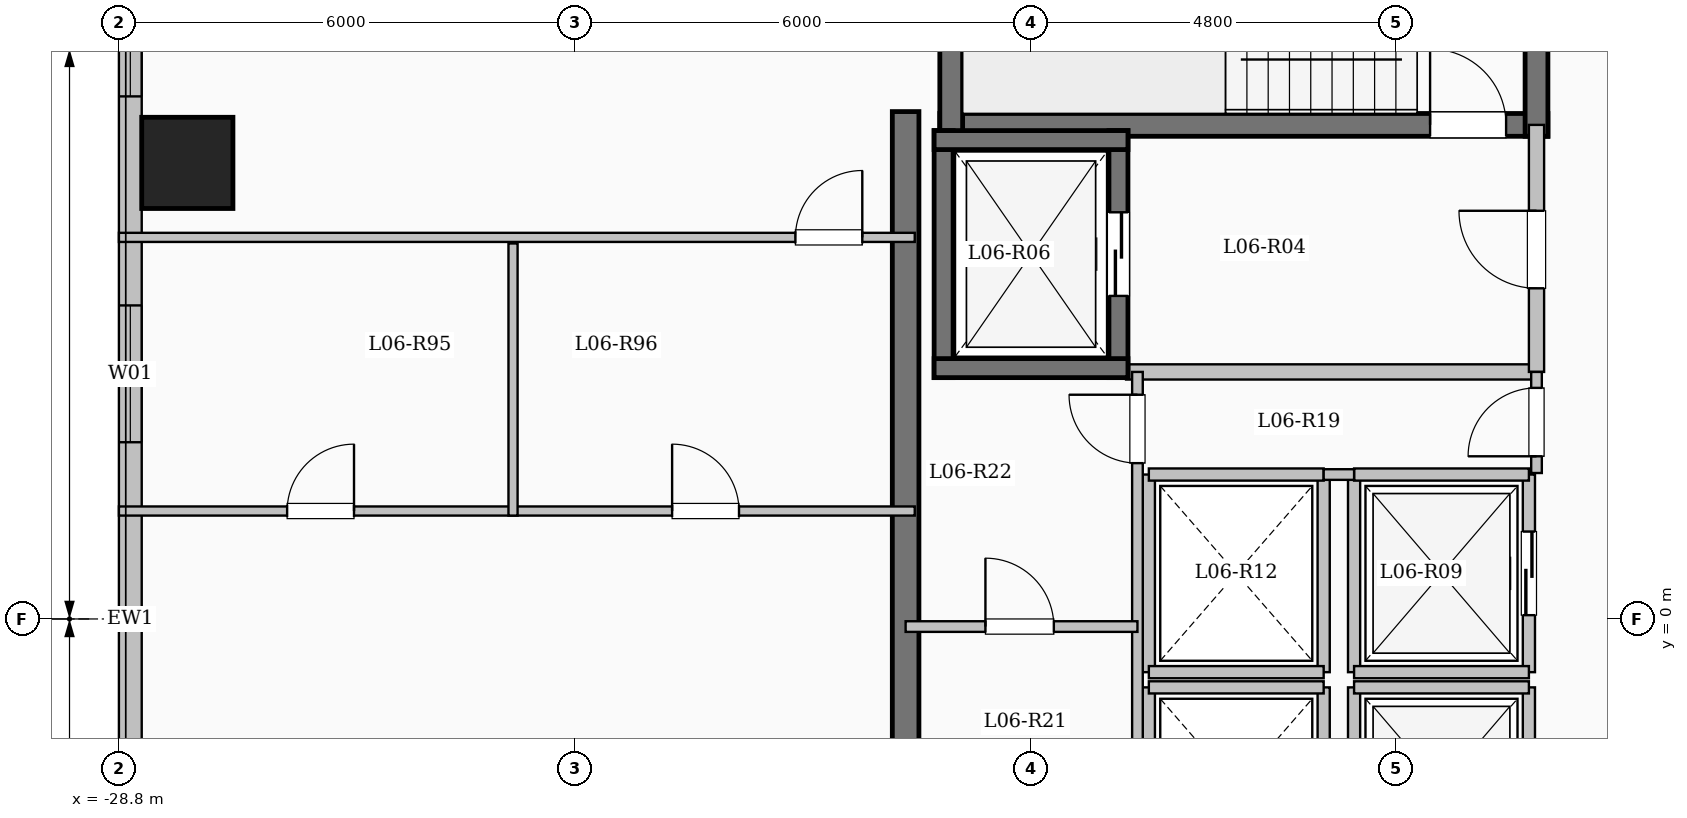
"""IFC4 building model, lengths in metres.
Left out: names, types, materials, properties, quantities, classifications, styles, units other than length and angle.
Written with IfcOpenShell. Run it as: python <this file> out.ifc"""

import sys

from ifc_helpers import new_model, si_unit, direction, frame, frame_2d, origin, origin_2d, place, context, subcontext, project, spatial, rectangle, extrude, element, fill, save


model = new_model("IFC4")
c1 = context("Model", 3, precision=1e-05, world=origin(), true_north=direction((0.0, 1.0)))
c2 = subcontext(c1, "Body", "Model", "MODEL_VIEW")
j1 = project(units=[si_unit("LENGTHUNIT", "METRE"), si_unit("PLANEANGLEUNIT", "RADIAN")], contexts=[c1])
p1 = place(None, origin())
s1 = spatial("IfcSite", under=j1, at=p1, CompositionType="ELEMENT")
p2 = place(p1, origin())
s2 = spatial("IfcBuilding", under=s1, at=p2, CompositionType="ELEMENT")
p3 = place(p2, frame((0.0, 0.0, 27.35)))
s3 = spatial("IfcBuildingStorey", under=s2, at=p3, CompositionType="ELEMENT", Elevation=27.35)
p4 = place(p3, frame((-27.9, 6.0, 0.0), z_axis=(0.0, 0.0, 1.0), x_axis=(1.0, 0.0, 0.0)))
e1 = element("IfcColumn", 1, at=p4, inside=s3, PredefinedType="COLUMN", context=c2, shape_type="SweptSolid", body=[
    extrude(rectangle(XDim=1.2, YDim=1.2, at=origin_2d()), origin(), (0.0, 0.0, 1.0), 3.35),
])
p5 = place(p3, frame((-28.65, -19.05, 0.0), z_axis=(0.0, 0.0, 1.0), x_axis=(0.0, 1.0, 0.0)))
e2 = element("IfcWall", 2, at=p5, inside=s3, PredefinedType="SOLIDWALL", context=c2, shape_type="SweptSolid", body=[
    extrude(rectangle(XDim=38.1, YDim=0.3, at=frame_2d((19.05, 0.0))), origin(), (0.0, 0.0, 1.0), 3.1),
])
p6 = place(p5, frame((3.15, 0.0, 0.9)))
e3 = element("IfcOpeningElement", 3, at=p6, cuts=e2, PredefinedType="OPENING", context=c2, shape_type="SweptSolid", body=[
    extrude(rectangle(XDim=2.4, YDim=1.8, at=frame_2d((1.2, 0.9))), frame((0.0, 0.16, 0.0), z_axis=(0.0, -1.0, 0.0), x_axis=(1.0, 0.0, 0.0)), (0.0, 0.0, 1.0), 0.32),
])
p7 = place(p5, frame((9.542, 0.0, 0.9)))
e4 = element("IfcOpeningElement", 4, at=p7, cuts=e2, PredefinedType="OPENING", context=c2, shape_type="SweptSolid", body=[
    extrude(rectangle(XDim=1.5, YDim=1.65, at=frame_2d((0.75, 0.825))), frame((0.0, 0.16, 0.0), z_axis=(0.0, -1.0, 0.0), x_axis=(1.0, 0.0, 0.0)), (0.0, 0.0, 1.0), 0.32),
])
p8 = place(p5, frame((14.95, 0.0, 0.9)))
e5 = element("IfcOpeningElement", 5, at=p8, cuts=e2, PredefinedType="OPENING", context=c2, shape_type="SweptSolid", body=[
    extrude(rectangle(XDim=2.4, YDim=1.8, at=frame_2d((1.2, 0.9))), frame((0.0, 0.16, 0.0), z_axis=(0.0, -1.0, 0.0), x_axis=(1.0, 0.0, 0.0)), (0.0, 0.0, 1.0), 0.32),
])
p9 = place(p5, frame((21.375, 0.0, 0.9)))
e6 = element("IfcOpeningElement", 6, at=p9, cuts=e2, PredefinedType="OPENING", context=c2, shape_type="SweptSolid", body=[
    extrude(rectangle(XDim=1.8, YDim=1.65, at=frame_2d((0.9, 0.825))), frame((0.0, 0.16, 0.0), z_axis=(0.0, -1.0, 0.0), x_axis=(1.0, 0.0, 0.0)), (0.0, 0.0, 1.0), 0.32),
])
p10 = place(p5, frame((25.925, 0.0, 0.9)))
e7 = element("IfcOpeningElement", 7, at=p10, cuts=e2, PredefinedType="OPENING", context=c2, shape_type="SweptSolid", body=[
    extrude(rectangle(XDim=2.0, YDim=1.7, at=frame_2d((1.0, 0.85))), frame((0.0, 0.16, 0.0), z_axis=(0.0, -1.0, 0.0), x_axis=(1.0, 0.0, 0.0)), (0.0, 0.0, 1.0), 0.32),
])
p11 = place(p5, frame((30.175, 0.0, 0.95)))
e8 = element("IfcOpeningElement", 8, at=p11, cuts=e2, PredefinedType="OPENING", context=c2, shape_type="SweptSolid", body=[
    extrude(rectangle(XDim=1.0, YDim=1.5, at=frame_2d((0.5, 0.75))), frame((0.0, 0.16, 0.0), z_axis=(0.0, -1.0, 0.0), x_axis=(1.0, 0.0, 0.0)), (0.0, 0.0, 1.0), 0.32),
])
p12 = place(p5, frame((33.85, 0.0, 0.9)))
e9 = element("IfcOpeningElement", 9, at=p12, cuts=e2, PredefinedType="OPENING", context=c2, shape_type="SweptSolid", body=[
    extrude(rectangle(XDim=2.0, YDim=1.7, at=frame_2d((1.0, 0.85))), frame((0.0, 0.16, 0.0), z_axis=(0.0, -1.0, 0.0), x_axis=(1.0, 0.0, 0.0)), (0.0, 0.0, 1.0), 0.32),
])
p13 = place(p3, frame((-18.0, 6.5, 0.0), z_axis=(0.0, 0.0, 1.0), x_axis=(1.0, 0.0, 0.0)))
e10 = element("IfcWall", 10, at=p13, inside=s3, PredefinedType="SHEAR", context=c2, shape_type="SweptSolid", body=[
    extrude(rectangle(XDim=8.0, YDim=0.3, at=frame_2d((4.0, 0.0))), origin(), (0.0, 0.0, 1.0), 3.35),
])
p14 = place(p13, frame((6.45, 0.0, 0.0)))
e11 = element("IfcOpeningElement", 11, at=p14, cuts=e10, PredefinedType="OPENING", context=c2, shape_type="SweptSolid", body=[
    extrude(rectangle(XDim=1.0, YDim=2.15, at=frame_2d((0.5, 1.075))), frame((0.0, 0.16, 0.0), z_axis=(0.0, -1.0, 0.0), x_axis=(1.0, 0.0, 0.0)), (0.0, 0.0, 1.0), 0.32),
])
for number, where, z_axis, x_axis in (
    (12, (-17.85, 6.35, 0.0), (0.0, 0.0, 1.0), (0.0, 1.0, 0.0)),
    (13, (-10.15, 6.35, 0.0), (0.0, 0.0, 1.0), (0.0, 1.0, 0.0)),
):
    element("IfcWall", number, at=place(p3, frame(where, z_axis=z_axis, x_axis=x_axis)), inside=s3, PredefinedType="SHEAR", context=c2, shape_type="SweptSolid", body=[
        extrude(rectangle(XDim=3.59, YDim=0.3, at=frame_2d((1.795, 0.0))), origin(), (0.0, 0.0, 1.0), 3.35),
    ])
p15 = place(p3, frame((-15.55, 3.25, 0.0), z_axis=(0.0, 0.0, 1.0), x_axis=(1.0, 0.0, 0.0)))
e14 = element("IfcWall", 14, at=p15, inside=s3, PredefinedType="SOLIDWALL", context=c2, shape_type="SweptSolid", body=[
    extrude(rectangle(XDim=5.4, YDim=0.2, at=frame_2d((2.7, 0.0))), origin(), (0.0, 0.0, 1.0), 3.1),
])
p16 = place(p3, frame((-10.15, 3.25, 0.0), z_axis=(0.0, 0.0, 1.0), x_axis=(0.0, 1.0, 0.0)))
e15 = element("IfcWall", 15, at=p16, inside=s3, PredefinedType="SOLIDWALL", context=c2, shape_type="SweptSolid", body=[
    extrude(rectangle(XDim=3.25, YDim=0.2, at=frame_2d((1.625, 0.0))), origin(), (0.0, 0.0, 1.0), 3.1),
])
p17 = place(p16, frame((1.1, 0.0, 0.0)))
e16 = element("IfcOpeningElement", 16, at=p17, cuts=e15, PredefinedType="OPENING", context=c2, shape_type="SweptSolid", body=[
    extrude(rectangle(XDim=1.02, YDim=2.15, at=frame_2d((0.51, 1.075))), frame((0.0, 0.11, 0.0), z_axis=(0.0, -1.0, 0.0), x_axis=(1.0, 0.0, 0.0)), (0.0, 0.0, 1.0), 0.22),
])
p18 = place(p3, frame((-17.95, 3.175, 0.0), z_axis=(0.0, 0.0, 1.0), x_axis=(0.0, 1.0, 0.0)))
e17 = element("IfcWall", 17, at=p18, inside=s3, PredefinedType="SHEAR", context=c2, shape_type="SweptSolid", body=[
    extrude(rectangle(XDim=3.25, YDim=0.25, at=frame_2d((1.625, 0.0))), origin(), (0.0, 0.0, 1.0), 3.35),
])
p19 = place(p3, frame((-15.65, 3.175, 0.0), z_axis=(0.0, 0.0, 1.0), x_axis=(0.0, 1.0, 0.0)))
e18 = element("IfcWall", 18, at=p19, inside=s3, PredefinedType="SHEAR", context=c2, shape_type="SweptSolid", body=[
    extrude(rectangle(XDim=3.25, YDim=0.25, at=frame_2d((1.625, 0.0))), origin(), (0.0, 0.0, 1.0), 3.35),
])
p20 = place(p19, frame((1.075, 0.0, 0.0)))
e19 = element("IfcOpeningElement", 19, at=p20, cuts=e18, PredefinedType="OPENING", context=c2, shape_type="SweptSolid", body=[
    extrude(rectangle(XDim=1.1, YDim=2.15, at=frame_2d((0.55, 1.075))), frame((0.0, 0.135, 0.0), z_axis=(0.0, -1.0, 0.0), x_axis=(1.0, 0.0, 0.0)), (0.0, 0.0, 1.0), 0.27),
])
for number, where, z_axis, x_axis in (
    (20, (-18.075, 3.3, 0.0), (0.0, 0.0, 1.0), (1.0, 0.0, 0.0)),
    (21, (-18.075, 6.3, 0.0), (0.0, 0.0, 1.0), (1.0, 0.0, 0.0)),
):
    element("IfcWall", number, at=place(p3, frame(where, z_axis=z_axis, x_axis=x_axis)), inside=s3, PredefinedType="SHEAR", context=c2, shape_type="SweptSolid", body=[
        extrude(rectangle(XDim=2.55, YDim=0.25, at=frame_2d((1.275, 0.0))), origin(), (0.0, 0.0, 1.0), 3.35),
    ])
p21 = place(p3, frame((-12.55, -3.5, 0.0), z_axis=(0.0, 0.0, 1.0), x_axis=(0.0, 1.0, 0.0)))
e22 = element("IfcWall", 22, at=p21, inside=s3, PredefinedType="SOLIDWALL", context=c2, shape_type="SweptSolid", body=[
    extrude(rectangle(XDim=2.6, YDim=0.16, at=frame_2d((1.3, 0.0))), origin(), (0.0, 0.0, 1.0), 3.1),
])
p22 = place(p3, frame((-10.25, -3.5, 0.0), z_axis=(0.0, 0.0, 1.0), x_axis=(0.0, 1.0, 0.0)))
e23 = element("IfcWall", 23, at=p22, inside=s3, PredefinedType="SOLIDWALL", context=c2, shape_type="SweptSolid", body=[
    extrude(rectangle(XDim=2.6, YDim=0.16, at=frame_2d((1.3, 0.0))), origin(), (0.0, 0.0, 1.0), 3.1),
])
p23 = place(p22, frame((0.75, 0.0, 0.0)))
e24 = element("IfcOpeningElement", 24, at=p23, cuts=e23, PredefinedType="OPENING", context=c2, shape_type="SweptSolid", body=[
    extrude(rectangle(XDim=1.1, YDim=2.15, at=frame_2d((0.55, 1.075))), frame((0.0, 0.09, 0.0), z_axis=(0.0, -1.0, 0.0), x_axis=(1.0, 0.0, 0.0)), (0.0, 0.0, 1.0), 0.18),
])
p24 = place(p3, frame((-12.55, -0.9, 0.0), z_axis=(0.0, 0.0, 1.0), x_axis=(1.0, 0.0, 0.0)))
e25 = element("IfcWall", 25, at=p24, inside=s3, PredefinedType="SOLIDWALL", context=c2, shape_type="SweptSolid", body=[
    extrude(rectangle(XDim=2.3, YDim=0.16, at=frame_2d((1.15, 0.0))), origin(), (0.0, 0.0, 1.0), 3.1),
])
p25 = place(p3, frame((-12.55, -0.7, 0.0), z_axis=(0.0, 0.0, 1.0), x_axis=(0.0, 1.0, 0.0)))
e26 = element("IfcWall", 26, at=p25, inside=s3, PredefinedType="SOLIDWALL", context=c2, shape_type="SweptSolid", body=[
    extrude(rectangle(XDim=2.6, YDim=0.16, at=frame_2d((1.3, 0.0))), origin(), (0.0, 0.0, 1.0), 3.1),
])
p26 = place(p3, frame((-10.25, -0.7, 0.0), z_axis=(0.0, 0.0, 1.0), x_axis=(0.0, 1.0, 0.0)))
e27 = element("IfcWall", 27, at=p26, inside=s3, PredefinedType="SOLIDWALL", context=c2, shape_type="SweptSolid", body=[
    extrude(rectangle(XDim=2.6, YDim=0.16, at=frame_2d((1.3, 0.0))), origin(), (0.0, 0.0, 1.0), 3.1),
])
p27 = place(p26, frame((0.75, 0.0, 0.0)))
e28 = element("IfcOpeningElement", 28, at=p27, cuts=e27, PredefinedType="OPENING", context=c2, shape_type="SweptSolid", body=[
    extrude(rectangle(XDim=1.1, YDim=2.15, at=frame_2d((0.55, 1.075))), frame((0.0, 0.09, 0.0), z_axis=(0.0, -1.0, 0.0), x_axis=(1.0, 0.0, 0.0)), (0.0, 0.0, 1.0), 0.18),
])
for number, where, z_axis, x_axis in (
    (29, (-12.55, -0.7, 0.0), (0.0, 0.0, 1.0), (1.0, 0.0, 0.0)),
    (30, (-12.55, 1.9, 0.0), (0.0, 0.0, 1.0), (1.0, 0.0, 0.0)),
):
    element("IfcWall", number, at=place(p3, frame(where, z_axis=z_axis, x_axis=x_axis)), inside=s3, PredefinedType="SOLIDWALL", context=c2, shape_type="SweptSolid", body=[
        extrude(rectangle(XDim=2.3, YDim=0.16, at=frame_2d((1.15, 0.0))), origin(), (0.0, 0.0, 1.0), 3.1),
    ])
for number, where, z_axis, x_axis in (
    (31, (-15.25, -3.5, 0.0), (0.0, 0.0, 1.0), (0.0, 1.0, 0.0)),
    (32, (-12.95, -3.5, 0.0), (0.0, 0.0, 1.0), (0.0, 1.0, 0.0)),
):
    element("IfcWall", number, at=place(p3, frame(where, z_axis=z_axis, x_axis=x_axis)), inside=s3, PredefinedType="SOLIDWALL", context=c2, shape_type="SweptSolid", body=[
        extrude(rectangle(XDim=2.6, YDim=0.16, at=frame_2d((1.3, 0.0))), origin(), (0.0, 0.0, 1.0), 3.1),
    ])
p28 = place(p3, frame((-15.25, -0.9, 0.0), z_axis=(0.0, 0.0, 1.0), x_axis=(1.0, 0.0, 0.0)))
e33 = element("IfcWall", 33, at=p28, inside=s3, PredefinedType="SOLIDWALL", context=c2, shape_type="SweptSolid", body=[
    extrude(rectangle(XDim=2.3, YDim=0.16, at=frame_2d((1.15, 0.0))), origin(), (0.0, 0.0, 1.0), 3.1),
])
for number, where, z_axis, x_axis in (
    (34, (-15.25, -0.7, 0.0), (0.0, 0.0, 1.0), (0.0, 1.0, 0.0)),
    (35, (-12.95, -0.7, 0.0), (0.0, 0.0, 1.0), (0.0, 1.0, 0.0)),
):
    element("IfcWall", number, at=place(p3, frame(where, z_axis=z_axis, x_axis=x_axis)), inside=s3, PredefinedType="SOLIDWALL", context=c2, shape_type="SweptSolid", body=[
        extrude(rectangle(XDim=2.6, YDim=0.16, at=frame_2d((1.3, 0.0))), origin(), (0.0, 0.0, 1.0), 3.1),
    ])
for number, where, z_axis, x_axis in (
    (36, (-15.25, -0.7, 0.0), (0.0, 0.0, 1.0), (1.0, 0.0, 0.0)),
    (37, (-15.25, 1.9, 0.0), (0.0, 0.0, 1.0), (1.0, 0.0, 0.0)),
):
    element("IfcWall", number, at=place(p3, frame(where, z_axis=z_axis, x_axis=x_axis)), inside=s3, PredefinedType="SOLIDWALL", context=c2, shape_type="SweptSolid", body=[
        extrude(rectangle(XDim=2.3, YDim=0.16, at=frame_2d((1.15, 0.0))), origin(), (0.0, 0.0, 1.0), 3.1),
    ])
p29 = place(p3, frame((-18.45, -7.375, 0.0), z_axis=(0.0, 0.0, 1.0), x_axis=(0.0, 1.0, 0.0)))
e38 = element("IfcWall", 38, at=p29, inside=s3, PredefinedType="SHEAR", context=c2, shape_type="SweptSolid", body=[
    extrude(rectangle(XDim=14.05, YDim=0.35, at=frame_2d((7.025, 0.0))), origin(), (0.0, 0.0, 1.0), 3.35),
])
p30 = place(p3, frame((-12.95, 1.9, 0.0), z_axis=(0.0, 0.0, 1.0), x_axis=(1.0, 0.0, 0.0)))
e39 = element("IfcWall", 39, at=p30, inside=s3, PredefinedType="PARTITIONING", context=c2, shape_type="SweptSolid", body=[
    extrude(rectangle(XDim=0.4, YDim=0.14, at=frame_2d((0.2, 0.0))), origin(), (0.0, 0.0, 1.0), 3.1),
])
p31 = place(p3, frame((-10.15, 1.92, 0.0), z_axis=(0.0, 0.0, 1.0), x_axis=(0.0, 1.0, 0.0)))
e40 = element("IfcWall", 40, at=p31, inside=s3, PredefinedType="PARTITIONING", context=c2, shape_type="SweptSolid", body=[
    extrude(rectangle(XDim=1.33, YDim=0.14, at=frame_2d((0.665, 0.0))), origin(), (0.0, 0.0, 1.0), 3.1),
])
p32 = place(p31, frame((0.22, 0.0, 0.0)))
e41 = element("IfcOpeningElement", 41, at=p32, cuts=e40, PredefinedType="OPENING", context=c2, shape_type="SweptSolid", body=[
    extrude(rectangle(XDim=0.9, YDim=2.08, at=frame_2d((0.45, 1.04))), frame((0.0, 0.08, 0.0), z_axis=(0.0, -1.0, 0.0), x_axis=(1.0, 0.0, 0.0)), (0.0, 0.0, 1.0), 0.16),
])
p33 = place(p3, frame((-15.4, -7.2, 0.0), z_axis=(0.0, 0.0, 1.0), x_axis=(0.0, 1.0, 0.0)))
e42 = element("IfcWall", 42, at=p33, inside=s3, PredefinedType="PARTITIONING", context=c2, shape_type="SweptSolid", body=[
    extrude(rectangle(XDim=10.45, YDim=0.14, at=frame_2d((5.225, 0.0))), origin(), (0.0, 0.0, 1.0), 3.1),
])
p34 = place(p33, frame((9.25, 0.0, 0.0)))
e43 = element("IfcOpeningElement", 43, at=p34, cuts=e42, PredefinedType="OPENING", context=c2, shape_type="SweptSolid", body=[
    extrude(rectangle(XDim=0.9, YDim=2.08, at=frame_2d((0.45, 1.04))), frame((0.0, 0.08, 0.0), z_axis=(0.0, -1.0, 0.0), x_axis=(1.0, 0.0, 0.0)), (0.0, 0.0, 1.0), 0.16),
])
p35 = place(p3, frame((-18.45, -0.1, 0.0), z_axis=(0.0, 0.0, 1.0), x_axis=(1.0, 0.0, 0.0)))
e44 = element("IfcWall", 44, at=p35, inside=s3, PredefinedType="PARTITIONING", context=c2, shape_type="SweptSolid", body=[
    extrude(rectangle(XDim=3.05, YDim=0.14, at=frame_2d((1.525, 0.0))), origin(), (0.0, 0.0, 1.0), 3.1),
])
p36 = place(p35, frame((1.05, 0.0, 0.0)))
e45 = element("IfcOpeningElement", 45, at=p36, cuts=e44, PredefinedType="OPENING", context=c2, shape_type="SweptSolid", body=[
    extrude(rectangle(XDim=0.9, YDim=2.08, at=frame_2d((0.45, 1.04))), frame((0.0, 0.08, 0.0), z_axis=(0.0, -1.0, 0.0), x_axis=(1.0, 0.0, 0.0)), (0.0, 0.0, 1.0), 0.16),
])
p37 = place(p3, frame((-28.8, 1.42, 0.0), z_axis=(0.0, 0.0, 1.0), x_axis=(1.0, 0.0, 0.0)))
e46 = element("IfcWall", 46, at=p37, inside=s3, PredefinedType="PARTITIONING", context=c2, shape_type="SweptSolid", body=[
    extrude(rectangle(XDim=10.47, YDim=0.12, at=frame_2d((5.235, 0.0))), origin(), (0.0, 0.0, 1.0), 3.1),
])
p38 = place(p37, frame((2.213, 0.0, 0.0)))
e47 = element("IfcOpeningElement", 47, at=p38, cuts=e46, PredefinedType="OPENING", context=c2, shape_type="SweptSolid", body=[
    extrude(rectangle(XDim=0.88, YDim=2.1, at=frame_2d((0.44, 1.05))), frame((0.0, 0.07, 0.0), z_axis=(0.0, -1.0, 0.0), x_axis=(1.0, 0.0, 0.0)), (0.0, 0.0, 1.0), 0.14),
])
p39 = place(p37, frame((7.278, 0.0, 0.0)))
e48 = element("IfcOpeningElement", 48, at=p39, cuts=e46, PredefinedType="OPENING", context=c2, shape_type="SweptSolid", body=[
    extrude(rectangle(XDim=0.88, YDim=2.1, at=frame_2d((0.44, 1.05))), frame((0.0, 0.07, 0.0), z_axis=(0.0, -1.0, 0.0), x_axis=(1.0, 0.0, 0.0)), (0.0, 0.0, 1.0), 0.14),
])
p40 = place(p3, frame((-28.8, 5.02, 0.0), z_axis=(0.0, 0.0, 1.0), x_axis=(1.0, 0.0, 0.0)))
e49 = element("IfcWall", 49, at=p40, inside=s3, PredefinedType="PARTITIONING", context=c2, shape_type="SweptSolid", body=[
    extrude(rectangle(XDim=10.47, YDim=0.12, at=frame_2d((5.235, 0.0))), origin(), (0.0, 0.0, 1.0), 3.1),
])
p41 = place(p40, frame((8.9, 0.0, 0.0)))
e50 = element("IfcOpeningElement", 50, at=p41, cuts=e49, PredefinedType="OPENING", context=c2, shape_type="SweptSolid", body=[
    extrude(rectangle(XDim=0.88, YDim=2.1, at=frame_2d((0.44, 1.05))), frame((0.0, 0.07, 0.0), z_axis=(0.0, -1.0, 0.0), x_axis=(1.0, 0.0, 0.0)), (0.0, 0.0, 1.0), 0.14),
])
p42 = place(p3, frame((-23.615, 1.36, 0.0), z_axis=(0.0, 0.0, 1.0), x_axis=(0.0, 1.0, 0.0)))
e51 = element("IfcWall", 51, at=p42, inside=s3, PredefinedType="PARTITIONING", context=c2, shape_type="SweptSolid", body=[
    extrude(rectangle(XDim=3.58, YDim=0.12, at=frame_2d((1.79, 0.0))), origin(), (0.0, 0.0, 1.0), 3.1),
])
p43 = place(p9, origin())
e52 = element("IfcWindow", 52, at=p43, inside=s3, PartitioningType="SINGLE_PANEL", PredefinedType="WINDOW", context=c2, shape_type="SweptSolid", body=[
    extrude(rectangle(XDim=1.8, YDim=1.65, at=frame_2d((0.9, 0.825))), frame((0.0, 0.03, 0.0), z_axis=(0.0, -1.0, 0.0), x_axis=(1.0, 0.0, 0.0)), (0.0, 0.0, 1.0), 0.06),
])
fill(e6, e52)
p44 = place(p10, origin())
e53 = element("IfcWindow", 53, at=p44, inside=s3, PartitioningType="SINGLE_PANEL", PredefinedType="WINDOW", context=c2, shape_type="SweptSolid", body=[
    extrude(rectangle(XDim=2.0, YDim=1.7, at=frame_2d((1.0, 0.85))), frame((0.0, 0.03, 0.0), z_axis=(0.0, -1.0, 0.0), x_axis=(1.0, 0.0, 0.0)), (0.0, 0.0, 1.0), 0.06),
])
fill(e7, e53)
p45 = place(p14, origin())
e54 = element("IfcDoor", 54, at=p45, inside=s3, OperationType="SINGLE_SWING_LEFT", PredefinedType="DOOR", context=c2, shape_type="SweptSolid", body=[
    extrude(rectangle(XDim=1.0, YDim=2.15, at=frame_2d((0.5, 1.075))), frame((0.0, 0.025, 0.0), z_axis=(0.0, -1.0, 0.0), x_axis=(1.0, 0.0, 0.0)), (0.0, 0.0, 1.0), 0.05),
])
fill(e11, e54)
p46 = place(p17, origin())
e55 = element("IfcDoor", 55, at=p46, inside=s3, OperationType="SINGLE_SWING_RIGHT", PredefinedType="DOOR", context=c2, shape_type="SweptSolid", body=[
    extrude(rectangle(XDim=1.02, YDim=2.15, at=frame_2d((0.51, 1.075))), frame((0.0, 0.025, 0.0), z_axis=(0.0, -1.0, 0.0), x_axis=(1.0, 0.0, 0.0)), (0.0, 0.0, 1.0), 0.05),
])
fill(e16, e55)
p47 = place(p20, origin())
e56 = element("IfcDoor", 56, at=p47, inside=s3, OperationType="SLIDING_TO_LEFT", PredefinedType="DOOR", context=c2, shape_type="SweptSolid", body=[
    extrude(rectangle(XDim=1.1, YDim=2.15, at=frame_2d((0.55, 1.075))), frame((0.0, 0.025, 0.0), z_axis=(0.0, -1.0, 0.0), x_axis=(1.0, 0.0, 0.0)), (0.0, 0.0, 1.0), 0.05),
])
fill(e19, e56)
p48 = place(p27, origin())
e57 = element("IfcDoor", 57, at=p48, inside=s3, OperationType="SLIDING_TO_LEFT", PredefinedType="DOOR", context=c2, shape_type="SweptSolid", body=[
    extrude(rectangle(XDim=1.1, YDim=2.15, at=frame_2d((0.55, 1.075))), frame((0.0, 0.025, 0.0), z_axis=(0.0, -1.0, 0.0), x_axis=(1.0, 0.0, 0.0)), (0.0, 0.0, 1.0), 0.05),
])
fill(e28, e57)
p49 = place(p32, origin())
e58 = element("IfcDoor", 58, at=p49, inside=s3, OperationType="SINGLE_SWING_LEFT", PredefinedType="DOOR", context=c2, shape_type="SweptSolid", body=[
    extrude(rectangle(XDim=0.9, YDim=2.08, at=frame_2d((0.45, 1.04))), frame((0.0, 0.025, 0.0), z_axis=(0.0, -1.0, 0.0), x_axis=(1.0, 0.0, 0.0)), (0.0, 0.0, 1.0), 0.05),
])
fill(e41, e58)
p50 = place(p34, origin())
e59 = element("IfcDoor", 59, at=p50, inside=s3, OperationType="SINGLE_SWING_RIGHT", PredefinedType="DOOR", context=c2, shape_type="SweptSolid", body=[
    extrude(rectangle(XDim=0.9, YDim=2.08, at=frame_2d((0.45, 1.04))), frame((0.0, 0.025, 0.0), z_axis=(0.0, -1.0, 0.0), x_axis=(1.0, 0.0, 0.0)), (0.0, 0.0, 1.0), 0.05),
])
fill(e43, e59)
p51 = place(p36, origin())
e60 = element("IfcDoor", 60, at=p51, inside=s3, OperationType="SINGLE_SWING_LEFT", PredefinedType="DOOR", context=c2, shape_type="SweptSolid", body=[
    extrude(rectangle(XDim=0.9, YDim=2.08, at=frame_2d((0.45, 1.04))), frame((0.0, 0.025, 0.0), z_axis=(0.0, -1.0, 0.0), x_axis=(1.0, 0.0, 0.0)), (0.0, 0.0, 1.0), 0.05),
])
fill(e45, e60)
p52 = place(p38, origin())
e61 = element("IfcDoor", 61, at=p52, inside=s3, OperationType="SINGLE_SWING_RIGHT", PredefinedType="DOOR", context=c2, shape_type="SweptSolid", body=[
    extrude(rectangle(XDim=0.88, YDim=2.1, at=frame_2d((0.44, 1.05))), frame((0.0, 0.025, 0.0), z_axis=(0.0, -1.0, 0.0), x_axis=(1.0, 0.0, 0.0)), (0.0, 0.0, 1.0), 0.05),
])
fill(e47, e61)
p53 = place(p39, origin())
e62 = element("IfcDoor", 62, at=p53, inside=s3, OperationType="SINGLE_SWING_LEFT", PredefinedType="DOOR", context=c2, shape_type="SweptSolid", body=[
    extrude(rectangle(XDim=0.88, YDim=2.1, at=frame_2d((0.44, 1.05))), frame((0.0, 0.025, 0.0), z_axis=(0.0, -1.0, 0.0), x_axis=(1.0, 0.0, 0.0)), (0.0, 0.0, 1.0), 0.05),
])
fill(e48, e62)
p54 = place(p41, origin())
e63 = element("IfcDoor", 63, at=p54, inside=s3, OperationType="SINGLE_SWING_RIGHT", PredefinedType="DOOR", context=c2, shape_type="SweptSolid", body=[
    extrude(rectangle(XDim=0.88, YDim=2.1, at=frame_2d((0.44, 1.05))), frame((0.0, 0.025, 0.0), z_axis=(0.0, -1.0, 0.0), x_axis=(1.0, 0.0, 0.0)), (0.0, 0.0, 1.0), 0.05),
])
fill(e50, e63)
save(model, sys.argv[1])
